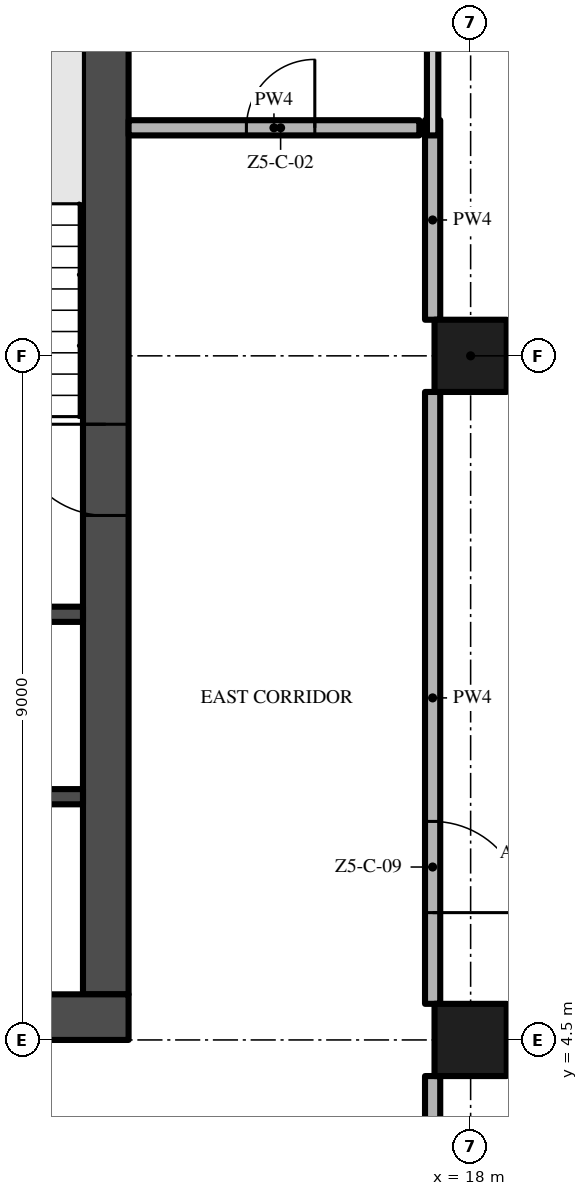
"""IFC4 building model, lengths in metres.
Left out: names, types, materials, properties, quantities, classifications, styles, units other than length and angle.
Written with IfcOpenShell. Run it as: python <this file> out.ifc"""

import sys

from ifc_helpers import new_model, si_unit, direction, frame, frame_2d, origin, origin_2d, place, context, subcontext, project, spatial, rectangle, extrude, element, fill, save


model = new_model("IFC4")
c1 = context("Model", 3, precision=1e-05, world=origin(), true_north=direction((0.0, 1.0)))
c2 = subcontext(c1, "Body", "Model", "MODEL_VIEW")
j1 = project(units=[si_unit("LENGTHUNIT", "METRE"), si_unit("PLANEANGLEUNIT", "RADIAN")], contexts=[c1])
p1 = place(None, origin())
s1 = spatial("IfcSite", under=j1, at=p1, CompositionType="ELEMENT")
p2 = place(p1, origin())
s2 = spatial("IfcBuilding", under=s1, at=p2, CompositionType="ELEMENT")
p3 = place(p2, frame((0.0, 0.0, 265.4)))
s3 = spatial("IfcBuildingStorey", under=s2, at=p3, CompositionType="ELEMENT", Elevation=265.4)
p4 = place(p3, frame((-13.5, 4.8, -0.3), z_axis=(0.0, 0.0, 1.0), x_axis=(1.0, 0.0, 0.0)))
e1 = element("IfcWall", 1, at=p4, inside=s3, PredefinedType="SHEAR", context=c2, shape_type="SweptSolid", body=[
    extrude(rectangle(XDim=27.0, YDim=0.6, at=frame_2d((13.5, 0.0))), origin(), (0.0, 0.0, 1.0), 3.8),
])
p5 = place(p4, frame((12.0, 0.0, 0.3)))
e2 = element("IfcOpeningElement", 2, at=p5, cuts=e1, PredefinedType="OPENING", context=c2, shape_type="SweptSolid", body=[
    extrude(rectangle(XDim=3.0, YDim=2.4, at=frame_2d((1.5, 1.2))), frame((0.0, 0.31, 0.0), z_axis=(0.0, -1.0, 0.0), x_axis=(1.0, 0.0, 0.0)), (0.0, 0.0, 1.0), 0.62),
])
p6 = place(p4, frame((4.9, 0.0, 0.3)))
e3 = element("IfcOpeningElement", 3, at=p6, cuts=e1, PredefinedType="OPENING", context=c2, shape_type="SweptSolid", body=[
    extrude(rectangle(XDim=1.2, YDim=2.2, at=frame_2d((0.6, 1.1))), frame((0.0, 0.31, 0.0), z_axis=(0.0, -1.0, 0.0), x_axis=(1.0, 0.0, 0.0)), (0.0, 0.0, 1.0), 0.62),
])
p7 = place(p4, frame((20.75, 0.0, 0.3)))
e4 = element("IfcOpeningElement", 4, at=p7, cuts=e1, PredefinedType="OPENING", context=c2, shape_type="SweptSolid", body=[
    extrude(rectangle(XDim=1.5, YDim=2.2, at=frame_2d((0.75, 1.1))), frame((0.0, 0.31, 0.0), z_axis=(0.0, -1.0, 0.0), x_axis=(1.0, 0.0, 0.0)), (0.0, 0.0, 1.0), 0.62),
])
p8 = place(p4, frame((17.4, 0.0, 0.3)))
e5 = element("IfcOpeningElement", 5, at=p8, cuts=e1, PredefinedType="OPENING", context=c2, shape_type="SweptSolid", body=[
    extrude(rectangle(XDim=1.2, YDim=2.2, at=frame_2d((0.6, 1.1))), frame((0.0, 0.31, 0.0), z_axis=(0.0, -1.0, 0.0), x_axis=(1.0, 0.0, 0.0)), (0.0, 0.0, 1.0), 0.62),
])
p9 = place(p3, frame((13.2, 5.1, -0.3), z_axis=(0.0, 0.0, 1.0), x_axis=(0.0, 1.0, 0.0)))
e6 = element("IfcWall", 6, at=p9, inside=s3, PredefinedType="SHEAR", context=c2, shape_type="SweptSolid", body=[
    extrude(rectangle(XDim=16.8, YDim=0.6, at=frame_2d((8.4, 0.0))), origin(), (0.0, 0.0, 1.0), 3.8),
])
p10 = place(p9, frame((6.3, 0.0, 0.3)))
e7 = element("IfcOpeningElement", 7, at=p10, cuts=e6, PredefinedType="OPENING", context=c2, shape_type="SweptSolid", body=[
    extrude(rectangle(XDim=1.2, YDim=2.2, at=frame_2d((0.6, 1.1))), frame((0.0, 0.31, 0.0), z_axis=(0.0, -1.0, 0.0), x_axis=(1.0, 0.0, 0.0)), (0.0, 0.0, 1.0), 0.62),
])
for number, where, z_axis, x_axis in (
    (8, (18.0, 13.5, 0.0), (0.0, 0.0, 1.0), (1.0, 0.0, 0.0)),
    (9, (18.0, 4.5, 0.0), (0.0, 0.0, 1.0), (1.0, 0.0, 0.0)),
):
    element("IfcColumn", number, at=place(p3, frame(where, z_axis=z_axis, x_axis=x_axis)), inside=s3, PredefinedType="COLUMN", context=c2, shape_type="SweptSolid", body=[
        extrude(rectangle(XDim=0.95, YDim=0.95, at=origin_2d()), origin(), (0.0, 0.0, 1.0), 3.5),
    ])
for number, where, z_axis, x_axis in (
    (10, (9.65, 7.7, 0.0), (0.0, 0.0, 1.0), (1.0, 0.0, 0.0)),
    (11, (9.65, 10.1, 0.0), (0.0, 0.0, 1.0), (1.0, 0.0, 0.0)),
):
    element("IfcWall", number, at=place(p3, frame(where, z_axis=z_axis, x_axis=x_axis)), inside=s3, PredefinedType="SHEAR", context=c2, shape_type="SweptSolid", body=[
        extrude(rectangle(XDim=3.25, YDim=0.2, at=frame_2d((1.625, 0.0))), origin(), (0.0, 0.0, 1.0), 3.5),
    ])
p11 = place(p3, frame((13.5, 16.5, 0.0), z_axis=(0.0, 0.0, 1.0), x_axis=(1.0, 0.0, 0.0)))
e12 = element("IfcWall", 12, at=p11, inside=s3, PredefinedType="PARTITIONING", context=c2, shape_type="SweptSolid", body=[
    extrude(rectangle(XDim=3.825, YDim=0.2, at=frame_2d((1.913, 0.0))), origin(), (0.0, 0.0, 1.0), 3.5),
])
p12 = place(p11, frame((1.55, 0.0, 0.0)))
e13 = element("IfcOpeningElement", 13, at=p12, cuts=e12, PredefinedType="OPENING", context=c2, shape_type="SweptSolid", body=[
    extrude(rectangle(XDim=0.9, YDim=2.1, at=frame_2d((0.45, 1.05))), frame((0.0, 0.11, 0.0), z_axis=(0.0, -1.0, 0.0), x_axis=(1.0, 0.0, 0.0)), (0.0, 0.0, 1.0), 0.22),
])
p13 = place(p3, frame((17.5, -0.2, 0.0), z_axis=(0.0, 0.0, 1.0), x_axis=(0.0, 1.0, 0.0)))
e14 = element("IfcWall", 14, at=p13, inside=s3, PredefinedType="PARTITIONING", context=c2, shape_type="SweptSolid", body=[
    extrude(rectangle(XDim=4.225, YDim=0.2, at=frame_2d((2.112, 0.0))), origin(), (0.0, 0.0, 1.0), 3.5),
])
p14 = place(p3, frame((17.5, 13.025, 0.0), z_axis=(0.0, 0.0, 1.0), x_axis=(0.0, -1.0, 0.0)))
e15 = element("IfcWall", 15, at=p14, inside=s3, PredefinedType="PARTITIONING", context=c2, shape_type="SweptSolid", body=[
    extrude(rectangle(XDim=8.05, YDim=0.2, at=frame_2d((4.025, 0.0))), origin(), (0.0, 0.0, 1.0), 3.5),
])
p15 = place(p14, frame((5.65, 0.0, 0.0)))
e16 = element("IfcOpeningElement", 16, at=p15, cuts=e15, PredefinedType="OPENING", context=c2, shape_type="SweptSolid", body=[
    extrude(rectangle(XDim=1.2, YDim=2.4, at=frame_2d((0.6, 1.2))), frame((0.0, 0.11, 0.0), z_axis=(0.0, -1.0, 0.0), x_axis=(1.0, 0.0, 0.0)), (0.0, 0.0, 1.0), 0.22),
])
p16 = place(p3, frame((17.5, 13.975, 0.0), z_axis=(0.0, 0.0, 1.0), x_axis=(0.0, 1.0, 0.0)))
e17 = element("IfcWall", 17, at=p16, inside=s3, PredefinedType="PARTITIONING", context=c2, shape_type="SweptSolid", body=[
    extrude(rectangle(XDim=2.625, YDim=0.2, at=frame_2d((1.312, 0.0))), origin(), (0.0, 0.0, 1.0), 3.5),
])
p17 = place(p3, frame((17.5, 16.4, 0.0), z_axis=(0.0, 0.0, 1.0), x_axis=(0.0, 1.0, 0.0)))
e18 = element("IfcWall", 18, at=p17, inside=s3, PredefinedType="PARTITIONING", context=c2, shape_type="SweptSolid", body=[
    extrude(rectangle(XDim=5.2, YDim=0.15, at=frame_2d((2.6, 0.0))), origin(), (0.0, 0.0, 1.0), 3.5),
])
p18 = place(p10, frame((1.2, 0.0, 0.0), z_axis=(0.0, 0.0, 1.0), x_axis=(-1.0, 0.0, 0.0)))
e19 = element("IfcDoor", 19, at=p18, inside=s3, OperationType="SINGLE_SWING_LEFT", PredefinedType="DOOR", context=c2, shape_type="SweptSolid", body=[
    extrude(rectangle(XDim=1.2, YDim=2.2, at=frame_2d((0.6, 1.1))), frame((0.0, 0.025, 0.0), z_axis=(0.0, -1.0, 0.0), x_axis=(1.0, 0.0, 0.0)), (0.0, 0.0, 1.0), 0.05),
])
fill(e7, e19)
p19 = place(p12, origin())
e20 = element("IfcDoor", 20, at=p19, inside=s3, OperationType="SINGLE_SWING_RIGHT", PredefinedType="DOOR", context=c2, shape_type="SweptSolid", body=[
    extrude(rectangle(XDim=0.9, YDim=2.1, at=frame_2d((0.45, 1.05))), frame((0.0, 0.025, 0.0), z_axis=(0.0, -1.0, 0.0), x_axis=(1.0, 0.0, 0.0)), (0.0, 0.0, 1.0), 0.05),
])
fill(e13, e20)
p20 = place(p15, origin())
e21 = element("IfcDoor", 21, at=p20, inside=s3, OperationType="SINGLE_SWING_RIGHT", PredefinedType="DOOR", context=c2, shape_type="SweptSolid", body=[
    extrude(rectangle(XDim=1.2, YDim=2.4, at=frame_2d((0.6, 1.2))), frame((0.0, 0.025, 0.0), z_axis=(0.0, -1.0, 0.0), x_axis=(1.0, 0.0, 0.0)), (0.0, 0.0, 1.0), 0.05),
])
fill(e16, e21)
save(model, sys.argv[1])
